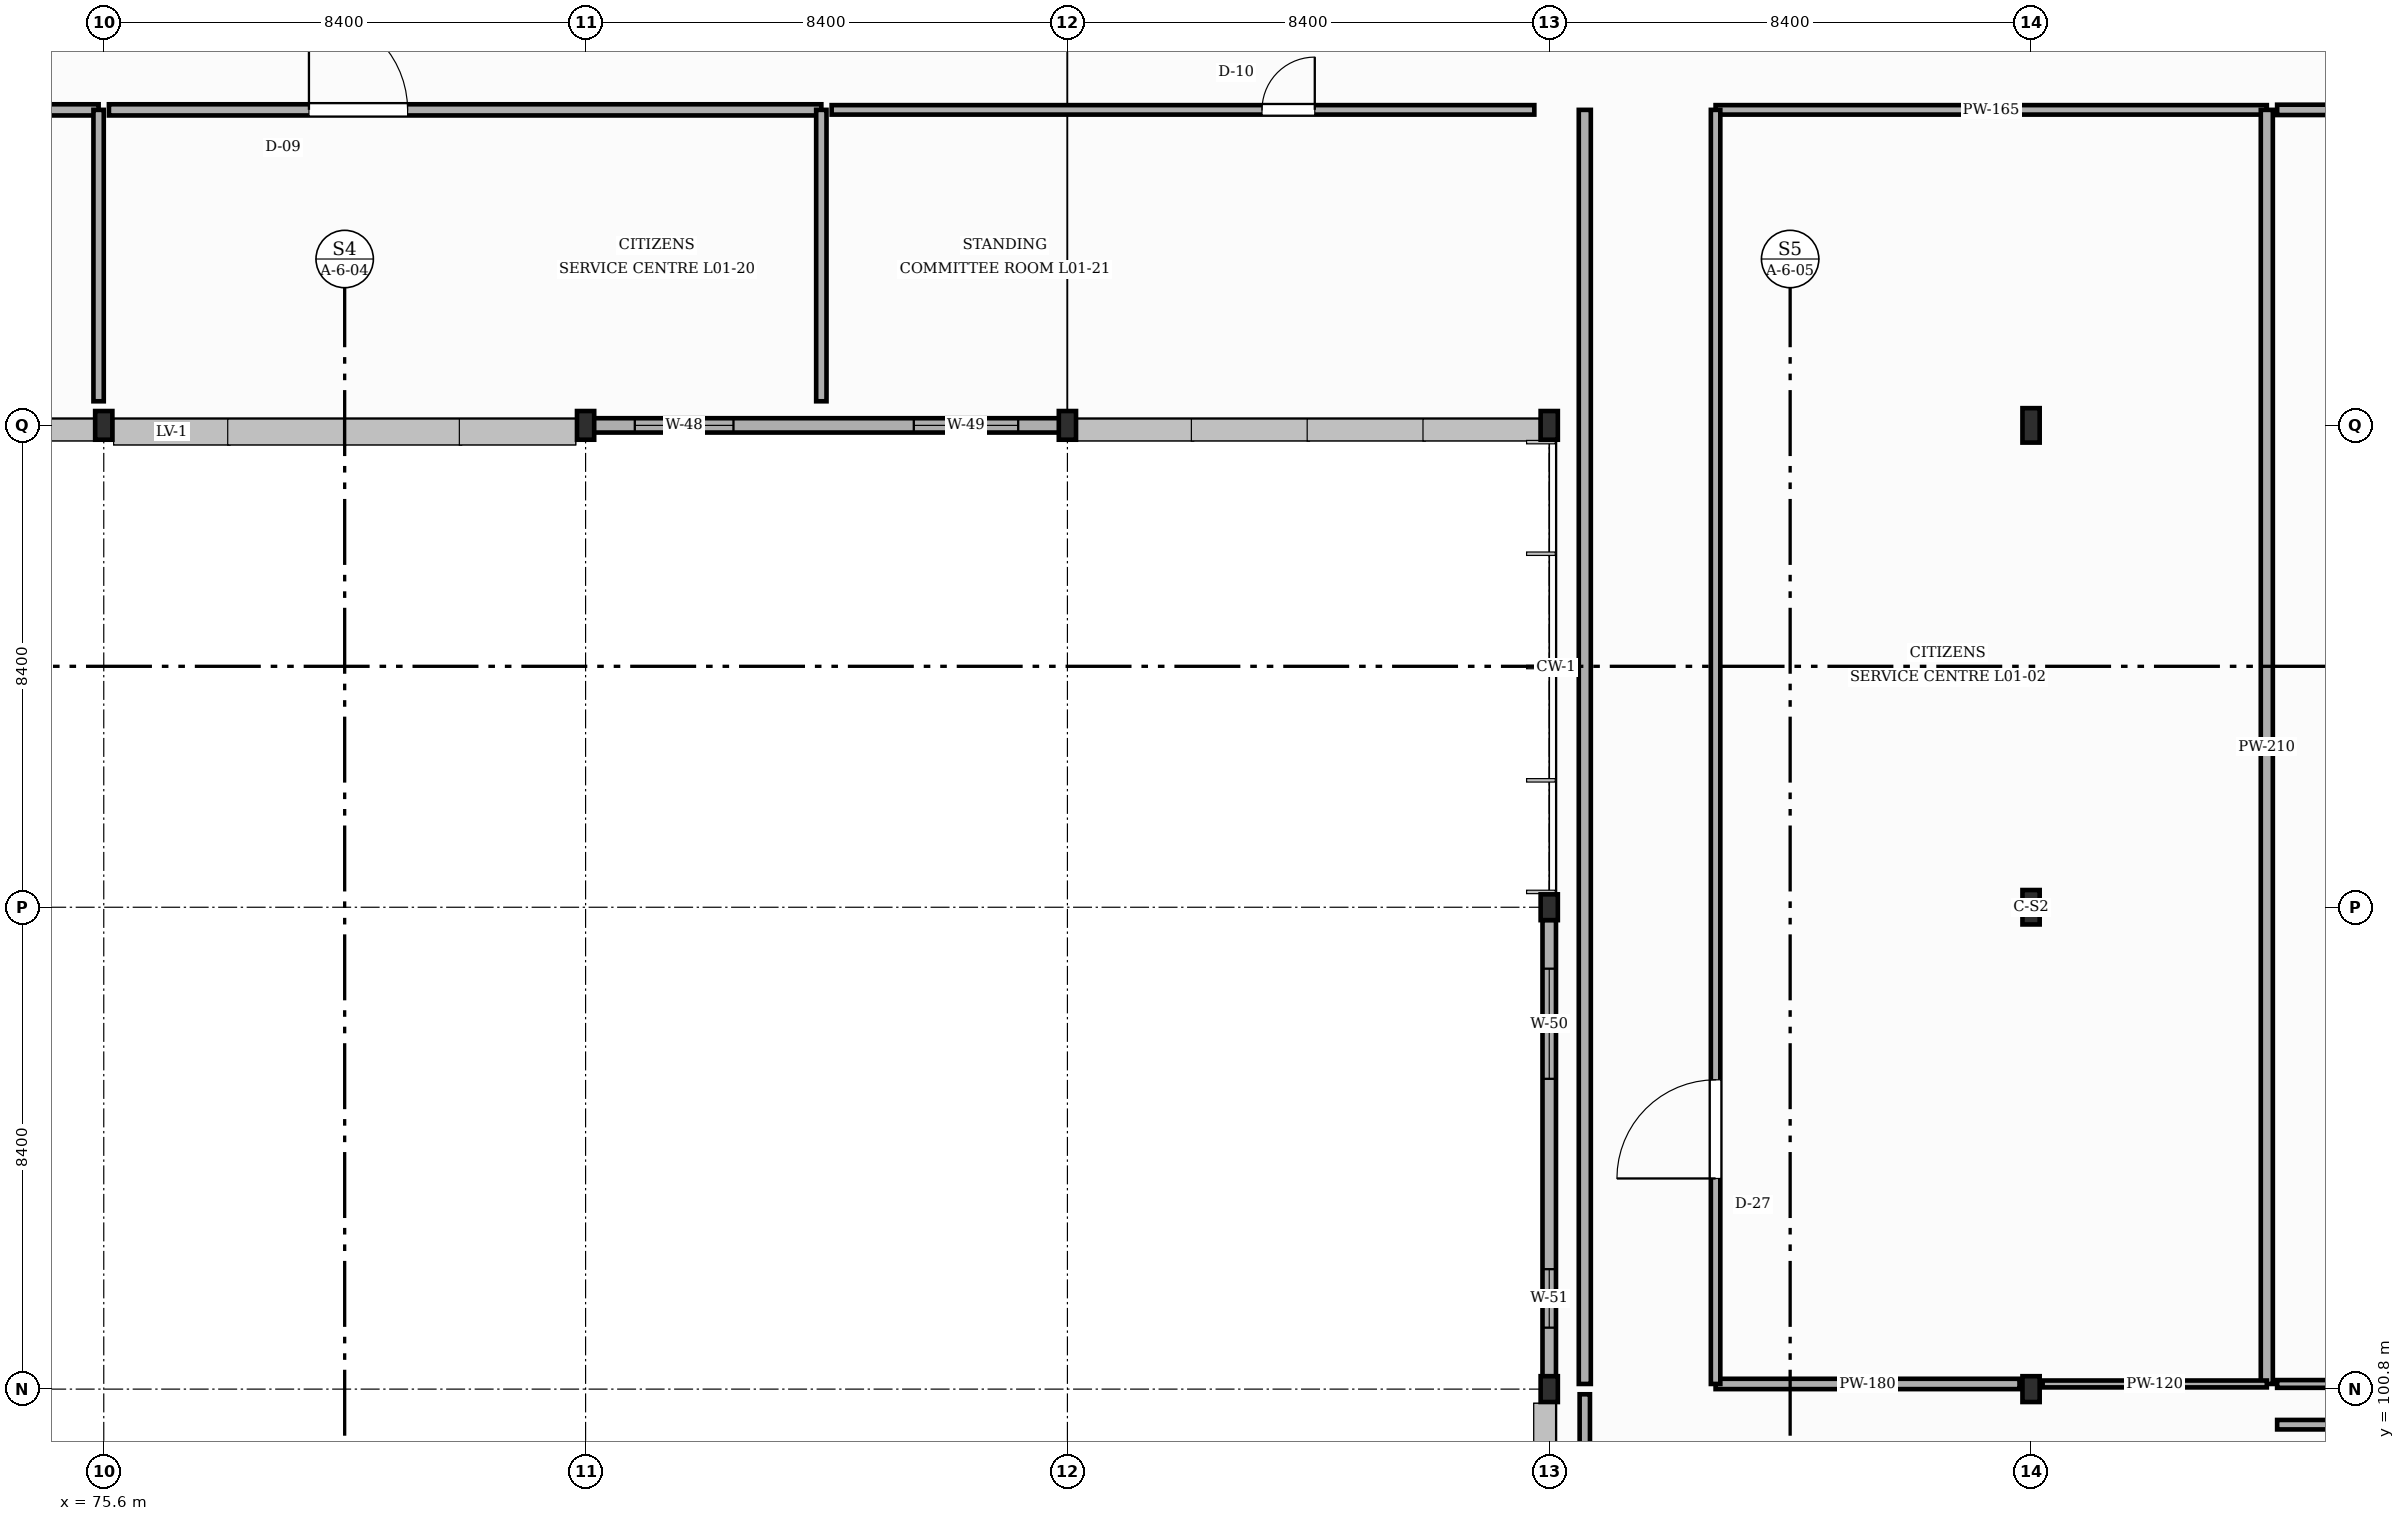
"""IFC4 building model, lengths in metres.
Left out: names, types, materials, properties, quantities, classifications, styles, units other than length and angle.
Written with IfcOpenShell. Run it as: python <this file> out.ifc"""

import sys

from ifc_helpers import new_model, si_unit, direction, frame, frame_2d, origin, origin_2d, place, context, subcontext, project, spatial, rectangle, i_section, extrude, element, fill, save


model = new_model("IFC4")
c1 = context("Model", 3, precision=1e-05, world=origin(), true_north=direction((0.0, 1.0)))
c2 = subcontext(c1, "Body", "Model", "MODEL_VIEW")
j1 = project(units=[si_unit("LENGTHUNIT", "METRE"), si_unit("PLANEANGLEUNIT", "RADIAN")], contexts=[c1])
p1 = place(None, origin())
s1 = spatial("IfcSite", under=j1, at=p1, CompositionType="ELEMENT")
p2 = place(p1, origin())
s2 = spatial("IfcBuilding", under=s1, at=p2, CompositionType="ELEMENT")
p3 = place(p2, frame((0.0, 0.0, 5.4)))
s3 = spatial("IfcBuildingStorey", under=s2, at=p3, CompositionType="ELEMENT", Elevation=5.4)
for number, where, z_axis, x_axis in (
    (1, (75.6, 117.6, 0.0), (0.0, 0.0, 1.0), (1.0, 0.0, 0.0)),
    (2, (84.0, 117.6, 0.0), (0.0, 0.0, 1.0), (1.0, 0.0, 0.0)),
    (3, (92.4, 117.6, 0.0), (0.0, 0.0, 1.0), (1.0, 0.0, 0.0)),
):
    element("IfcColumn", number, at=place(p3, frame(where, z_axis=z_axis, x_axis=x_axis)), inside=s3, PredefinedType="COLUMN", context=c2, shape_type="SweptSolid", body=[
        extrude(i_section(OverallWidth=0.3, OverallDepth=0.5, WebThickness=0.014, FlangeThickness=0.028, FilletRadius=0.027, at=origin_2d()), origin(), (0.0, 0.0, 1.0), 4.5),
    ])
for number, where, z_axis, x_axis in (
    (4, (100.8, 100.8, 0.0), (0.0, 0.0, 1.0), (1.0, 0.0, 0.0)),
    (5, (100.8, 109.2, 0.0), (0.0, 0.0, 1.0), (1.0, 0.0, 0.0)),
):
    element("IfcColumn", number, at=place(p3, frame(where, z_axis=z_axis, x_axis=x_axis)), inside=s3, PredefinedType="COLUMN", context=c2, shape_type="SweptSolid", body=[
        extrude(i_section(OverallWidth=0.3, OverallDepth=0.45, WebThickness=0.014, FlangeThickness=0.026, FilletRadius=0.027, at=origin_2d()), origin(), (0.0, 0.0, 1.0), 4.5),
    ])
p4 = place(p3, frame((100.8, 117.6, 0.0), z_axis=(0.0, 0.0, 1.0), x_axis=(1.0, 0.0, 0.0)))
e6 = element("IfcColumn", 6, at=p4, inside=s3, PredefinedType="COLUMN", context=c2, shape_type="SweptSolid", body=[
    extrude(i_section(OverallWidth=0.3, OverallDepth=0.5, WebThickness=0.014, FlangeThickness=0.028, FilletRadius=0.027, at=origin_2d()), origin(), (0.0, 0.0, 1.0), 4.5),
])
p5 = place(p3, frame((109.2, 100.8, 0.0), z_axis=(0.0, 0.0, 1.0), x_axis=(1.0, 0.0, 0.0)))
e7 = element("IfcColumn", 7, at=p5, inside=s3, PredefinedType="COLUMN", context=c2, shape_type="SweptSolid", body=[
    extrude(i_section(OverallWidth=0.3, OverallDepth=0.45, WebThickness=0.014, FlangeThickness=0.026, FilletRadius=0.027, at=origin_2d()), origin(), (0.0, 0.0, 1.0), 4.5),
])
for number, where, z_axis, x_axis in (
    (8, (109.2, 109.2, 0.0), (0.0, 0.0, 1.0), (1.0, 0.0, 0.0)),
    (9, (109.2, 117.6, 0.0), (0.0, 0.0, 1.0), (1.0, 0.0, 0.0)),
):
    element("IfcColumn", number, at=place(p3, frame(where, z_axis=z_axis, x_axis=x_axis)), inside=s3, PredefinedType="COLUMN", context=c2, shape_type="SweptSolid", body=[
        extrude(i_section(OverallWidth=0.3, OverallDepth=0.6, WebThickness=0.015, FlangeThickness=0.03, FilletRadius=0.027, at=origin_2d()), origin(), (0.0, 0.0, 1.0), 4.5),
    ])
p6 = place(p3, frame((84.008, 117.6, 0.0), z_axis=(0.0, 0.0, 1.0), x_axis=(1.0, 0.0, 0.0)))
e10 = element("IfcWall", 10, at=p6, inside=s3, PredefinedType="STANDARD", context=c2, shape_type="SweptSolid", body=[
    extrude(rectangle(XDim=8.384, YDim=0.25, at=frame_2d((4.192, 0.0))), origin(), (0.0, 0.0, 1.0), 3.922),
])
p7 = place(p6, frame((0.85, 0.0, 0.9)))
e11 = element("IfcOpeningElement", 11, at=p7, cuts=e10, PredefinedType="OPENING", context=c2, shape_type="SweptSolid", body=[
    extrude(rectangle(XDim=1.72, YDim=1.85, at=frame_2d((0.86, 0.925))), frame((0.0, 0.135, 0.0), z_axis=(0.0, -1.0, 0.0), x_axis=(1.0, 0.0, 0.0)), (0.0, 0.0, 1.0), 0.27),
])
p8 = place(p6, frame((5.714, 0.0, 0.9)))
e12 = element("IfcOpeningElement", 12, at=p8, cuts=e10, PredefinedType="OPENING", context=c2, shape_type="SweptSolid", body=[
    extrude(rectangle(XDim=1.82, YDim=1.85, at=frame_2d((0.91, 0.925))), frame((0.0, 0.135, 0.0), z_axis=(0.0, -1.0, 0.0), x_axis=(1.0, 0.0, 0.0)), (0.0, 0.0, 1.0), 0.27),
])
p9 = place(p3, frame((100.8, 108.979, 0.0), z_axis=(0.0, 0.0, 1.0), x_axis=(0.0, -1.0, 0.0)))
e13 = element("IfcWall", 13, at=p9, inside=s3, PredefinedType="STANDARD", context=c2, shape_type="SweptSolid", body=[
    extrude(rectangle(XDim=7.958, YDim=0.235, at=frame_2d((3.979, 0.0))), origin(), (0.0, 0.0, 1.0), 3.922),
])
p10 = place(p9, frame((0.85, 0.0, 0.9)))
e14 = element("IfcOpeningElement", 14, at=p10, cuts=e13, PredefinedType="OPENING", context=c2, shape_type="SweptSolid", body=[
    extrude(rectangle(XDim=1.92, YDim=1.85, at=frame_2d((0.96, 0.925))), frame((0.0, 0.127, 0.0), z_axis=(0.0, -1.0, 0.0), x_axis=(1.0, 0.0, 0.0)), (0.0, 0.0, 1.0), 0.255),
])
p11 = place(p9, frame((6.088, 0.0, 0.9)))
e15 = element("IfcOpeningElement", 15, at=p11, cuts=e13, PredefinedType="OPENING", context=c2, shape_type="SweptSolid", body=[
    extrude(rectangle(XDim=1.02, YDim=2.05, at=frame_2d((0.51, 1.025))), frame((0.0, 0.127, 0.0), z_axis=(0.0, -1.0, 0.0), x_axis=(1.0, 0.0, 0.0)), (0.0, 0.0, 1.0), 0.255),
])
p12 = place(p3, frame((103.7, 123.1, -0.004), z_axis=(0.0, 0.0, 1.0), x_axis=(1.0, 0.0, 0.0)))
e16 = element("IfcWall", 16, at=p12, inside=s3, PredefinedType="STANDARD", context=c2, shape_type="SweptSolid", body=[
    extrude(rectangle(XDim=9.61, YDim=0.165, at=frame_2d((4.805, 0.0))), origin(), (0.0, 0.0, 1.0), 4.294),
])
p13 = place(p3, frame((113.31, 123.1, -0.004), z_axis=(0.0, 0.0, 1.0), x_axis=(0.0, -1.0, 0.0)))
e17 = element("IfcWall", 17, at=p13, inside=s3, PredefinedType="STANDARD", context=c2, shape_type="SweptSolid", body=[
    extrude(rectangle(XDim=22.21, YDim=0.21, at=frame_2d((11.105, 0.0))), origin(), (0.0, 0.0, 1.0), 4.294),
])
p14 = place(p3, frame((113.31, 100.89, -0.004), z_axis=(0.0, 0.0, 1.0), x_axis=(-1.0, 0.0, 0.0)))
e18 = element("IfcWall", 18, at=p14, inside=s3, PredefinedType="STANDARD", context=c2, shape_type="SweptSolid", body=[
    extrude(rectangle(XDim=3.908, YDim=0.12, at=frame_2d((1.954, 0.0))), origin(), (0.0, 0.0, 1.0), 3.846),
])
p15 = place(p3, frame((108.998, 100.89, -0.004), z_axis=(0.0, 0.0, 1.0), x_axis=(-1.0, 0.0, 0.0)))
e19 = element("IfcWall", 19, at=p15, inside=s3, PredefinedType="STANDARD", context=c2, shape_type="SweptSolid", body=[
    extrude(rectangle(XDim=5.298, YDim=0.18, at=frame_2d((2.649, 0.0))), origin(), (0.0, 0.0, 1.0), 3.686),
])
p16 = place(p3, frame((103.7, 100.89, -0.004), z_axis=(0.0, 0.0, 1.0), x_axis=(0.0, 1.0, 0.0)))
e20 = element("IfcWall", 20, at=p16, inside=s3, PredefinedType="STANDARD", context=c2, shape_type="SweptSolid", body=[
    extrude(rectangle(XDim=22.21, YDim=0.165, at=frame_2d((11.105, 0.0))), origin(), (0.0, 0.0, 1.0), 3.986),
])
p17 = place(p16, frame((3.582, 0.0, 0.0)))
e21 = element("IfcOpeningElement", 21, at=p17, cuts=e20, PredefinedType="OPENING", context=c2, shape_type="SweptSolid", body=[
    extrude(rectangle(XDim=1.72, YDim=2.22, at=frame_2d((0.86, 1.11))), frame((0.0, 0.093, 0.0), z_axis=(0.0, -1.0, 0.0), x_axis=(1.0, 0.0, 0.0)), (0.0, 0.0, 1.0), 0.185),
])
p18 = place(p3, frame((117.18, 100.89, -0.004), z_axis=(0.0, 0.0, 1.0), x_axis=(-1.0, 0.0, 0.0)))
e22 = element("IfcWall", 22, at=p18, inside=s3, PredefinedType="STANDARD", context=c2, shape_type="SweptSolid", body=[
    extrude(rectangle(XDim=3.69, YDim=0.135, at=frame_2d((1.845, 0.0))), origin(), (0.0, 0.0, 1.0), 3.846),
])
p19 = place(p3, frame((113.49, 123.1, -0.004), z_axis=(0.0, 0.0, 1.0), x_axis=(1.0, 0.0, 0.0)))
e23 = element("IfcWall", 23, at=p19, inside=s3, PredefinedType="STANDARD", context=c2, shape_type="SweptSolid", body=[
    extrude(rectangle(XDim=12.42, YDim=0.18, at=frame_2d((6.21, 0.0))), origin(), (0.0, 0.0, 1.0), 4.294),
])
p20 = place(p19, frame((7.583, 0.0, 0.0)))
e24 = element("IfcOpeningElement", 24, at=p20, cuts=e23, PredefinedType="OPENING", context=c2, shape_type="SweptSolid", body=[
    extrude(rectangle(XDim=0.98, YDim=2.3, at=frame_2d((0.49, 1.15))), frame((0.0, 0.1, 0.0), z_axis=(0.0, -1.0, 0.0), x_axis=(1.0, 0.0, 0.0)), (0.0, 0.0, 1.0), 0.2),
])
p21 = place(p3, frame((101.42, 100.71, -0.004), z_axis=(0.0, 0.0, 1.0), x_axis=(0.0, -1.0, 0.0)))
e25 = element("IfcWall", 25, at=p21, inside=s3, PredefinedType="STANDARD", context=c2, shape_type="SweptSolid", body=[
    extrude(rectangle(XDim=11.49, YDim=0.18, at=frame_2d((5.745, 0.0))), origin(), (0.0, 0.0, 1.0), 4.294),
])
p22 = place(p3, frame((116.98, 100.18, -0.004), z_axis=(0.0, 0.0, 1.0), x_axis=(-1.0, 0.0, 0.0)))
e26 = element("IfcWall", 26, at=p22, inside=s3, PredefinedType="STANDARD", context=c2, shape_type="SweptSolid", body=[
    extrude(rectangle(XDim=3.49, YDim=0.165, at=frame_2d((1.745, 0.0))), origin(), (0.0, 0.0, 1.0), 4.294),
])
p23 = place(p3, frame((63.09, 123.1, -0.004), z_axis=(0.0, 0.0, 1.0), x_axis=(1.0, 0.0, 0.0)))
e27 = element("IfcWall", 27, at=p23, inside=s3, PredefinedType="STANDARD", context=c2, shape_type="SweptSolid", body=[
    extrude(rectangle(XDim=12.42, YDim=0.195, at=frame_2d((6.21, 0.0))), origin(), (0.0, 0.0, 1.0), 4.294),
])
p24 = place(p23, frame((7.373, 0.0, 0.0)))
e28 = element("IfcOpeningElement", 28, at=p24, cuts=e27, PredefinedType="OPENING", context=c2, shape_type="SweptSolid", body=[
    extrude(rectangle(XDim=1.4, YDim=2.06, at=frame_2d((0.7, 1.03))), frame((0.0, 0.107, 0.0), z_axis=(0.0, -1.0, 0.0), x_axis=(1.0, 0.0, 0.0)), (0.0, 0.0, 1.0), 0.215),
])
p25 = place(p3, frame((75.51, 123.1, -0.004), z_axis=(0.0, 0.0, 1.0), x_axis=(0.0, -1.0, 0.0)))
e29 = element("IfcWall", 29, at=p25, inside=s3, PredefinedType="STANDARD", context=c2, shape_type="SweptSolid", body=[
    extrude(rectangle(XDim=5.08, YDim=0.18, at=frame_2d((2.54, 0.0))), origin(), (0.0, 0.0, 1.0), 3.796),
])
p26 = place(p3, frame((75.69, 123.1, -0.004), z_axis=(0.0, 0.0, 1.0), x_axis=(1.0, 0.0, 0.0)))
e30 = element("IfcWall", 30, at=p26, inside=s3, PredefinedType="STANDARD", context=c2, shape_type="SweptSolid", body=[
    extrude(rectangle(XDim=12.42, YDim=0.195, at=frame_2d((6.21, 0.0))), origin(), (0.0, 0.0, 1.0), 4.294),
])
p27 = place(p26, frame((3.487, 0.0, 0.0)))
e31 = element("IfcOpeningElement", 31, at=p27, cuts=e30, PredefinedType="OPENING", context=c2, shape_type="SweptSolid", body=[
    extrude(rectangle(XDim=1.72, YDim=2.06, at=frame_2d((0.86, 1.03))), frame((0.0, 0.107, 0.0), z_axis=(0.0, -1.0, 0.0), x_axis=(1.0, 0.0, 0.0)), (0.0, 0.0, 1.0), 0.215),
])
p28 = place(p3, frame((88.11, 123.1, -0.004), z_axis=(0.0, 0.0, 1.0), x_axis=(0.0, -1.0, 0.0)))
e32 = element("IfcWall", 32, at=p28, inside=s3, PredefinedType="STANDARD", context=c2, shape_type="SweptSolid", body=[
    extrude(rectangle(XDim=5.08, YDim=0.18, at=frame_2d((2.54, 0.0))), origin(), (0.0, 0.0, 1.0), 4.294),
])
p29 = place(p3, frame((88.29, 123.1, -0.004), z_axis=(0.0, 0.0, 1.0), x_axis=(1.0, 0.0, 0.0)))
e33 = element("IfcWall", 33, at=p29, inside=s3, PredefinedType="STANDARD", context=c2, shape_type="SweptSolid", body=[
    extrude(rectangle(XDim=12.25, YDim=0.165, at=frame_2d((6.125, 0.0))), origin(), (0.0, 0.0, 1.0), 4.294),
])
p30 = place(p29, frame((7.502, 0.0, 0.0)))
e34 = element("IfcOpeningElement", 34, at=p30, cuts=e33, PredefinedType="OPENING", context=c2, shape_type="SweptSolid", body=[
    extrude(rectangle(XDim=0.92, YDim=2.14, at=frame_2d((0.46, 1.07))), frame((0.0, 0.093, 0.0), z_axis=(0.0, -1.0, 0.0), x_axis=(1.0, 0.0, 0.0)), (0.0, 0.0, 1.0), 0.185),
])
p31 = place(p3, frame((101.42, 123.1, -0.004), z_axis=(0.0, 0.0, 1.0), x_axis=(0.0, -1.0, 0.0)))
e35 = element("IfcWall", 35, at=p31, inside=s3, PredefinedType="STANDARD", context=c2, shape_type="SweptSolid", body=[
    extrude(rectangle(XDim=22.21, YDim=0.21, at=frame_2d((11.105, 0.0))), origin(), (0.0, 0.0, 1.0), 4.294),
])
p32 = place(p7, origin())
e36 = element("IfcWindow", 36, at=p32, inside=s3, PartitioningType="SINGLE_PANEL", PredefinedType="WINDOW", context=c2, shape_type="SweptSolid", body=[
    extrude(rectangle(XDim=1.72, YDim=1.85, at=frame_2d((0.86, 0.925))), frame((0.0, 0.03, 0.0), z_axis=(0.0, -1.0, 0.0), x_axis=(1.0, 0.0, 0.0)), (0.0, 0.0, 1.0), 0.06),
])
fill(e11, e36)
p33 = place(p8, origin())
e37 = element("IfcWindow", 37, at=p33, inside=s3, PartitioningType="SINGLE_PANEL", PredefinedType="WINDOW", context=c2, shape_type="SweptSolid", body=[
    extrude(rectangle(XDim=1.82, YDim=1.85, at=frame_2d((0.91, 0.925))), frame((0.0, 0.03, 0.0), z_axis=(0.0, -1.0, 0.0), x_axis=(1.0, 0.0, 0.0)), (0.0, 0.0, 1.0), 0.06),
])
fill(e12, e37)
p34 = place(p10, origin())
e38 = element("IfcWindow", 38, at=p34, inside=s3, PartitioningType="SINGLE_PANEL", PredefinedType="WINDOW", context=c2, shape_type="SweptSolid", body=[
    extrude(rectangle(XDim=1.92, YDim=1.85, at=frame_2d((0.96, 0.925))), frame((0.0, 0.03, 0.0), z_axis=(0.0, -1.0, 0.0), x_axis=(1.0, 0.0, 0.0)), (0.0, 0.0, 1.0), 0.06),
])
fill(e14, e38)
p35 = place(p11, origin())
e39 = element("IfcWindow", 39, at=p35, inside=s3, PartitioningType="SINGLE_PANEL", PredefinedType="WINDOW", context=c2, shape_type="SweptSolid", body=[
    extrude(rectangle(XDim=1.02, YDim=2.05, at=frame_2d((0.51, 1.025))), frame((0.0, 0.03, 0.0), z_axis=(0.0, -1.0, 0.0), x_axis=(1.0, 0.0, 0.0)), (0.0, 0.0, 1.0), 0.06),
])
fill(e15, e39)
p36 = place(p17, origin())
e40 = element("IfcDoor", 40, at=p36, inside=s3, OperationType="SINGLE_SWING_LEFT", PredefinedType="DOOR", context=c2, shape_type="SweptSolid", body=[
    extrude(rectangle(XDim=1.72, YDim=2.22, at=frame_2d((0.86, 1.11))), frame((0.0, 0.025, 0.0), z_axis=(0.0, -1.0, 0.0), x_axis=(1.0, 0.0, 0.0)), (0.0, 0.0, 1.0), 0.05),
])
fill(e21, e40)
p37 = place(p27, origin())
e41 = element("IfcDoor", 41, at=p37, inside=s3, OperationType="SINGLE_SWING_LEFT", PredefinedType="DOOR", context=c2, shape_type="SweptSolid", body=[
    extrude(rectangle(XDim=1.72, YDim=2.06, at=frame_2d((0.86, 1.03))), frame((0.0, 0.025, 0.0), z_axis=(0.0, -1.0, 0.0), x_axis=(1.0, 0.0, 0.0)), (0.0, 0.0, 1.0), 0.05),
])
fill(e31, e41)
p38 = place(p30, origin())
e42 = element("IfcDoor", 42, at=p38, inside=s3, OperationType="SINGLE_SWING_RIGHT", PredefinedType="DOOR", context=c2, shape_type="SweptSolid", body=[
    extrude(rectangle(XDim=0.92, YDim=2.14, at=frame_2d((0.46, 1.07))), frame((0.0, 0.025, 0.0), z_axis=(0.0, -1.0, 0.0), x_axis=(1.0, 0.0, 0.0)), (0.0, 0.0, 1.0), 0.05),
])
fill(e34, e42)
save(model, sys.argv[1])
